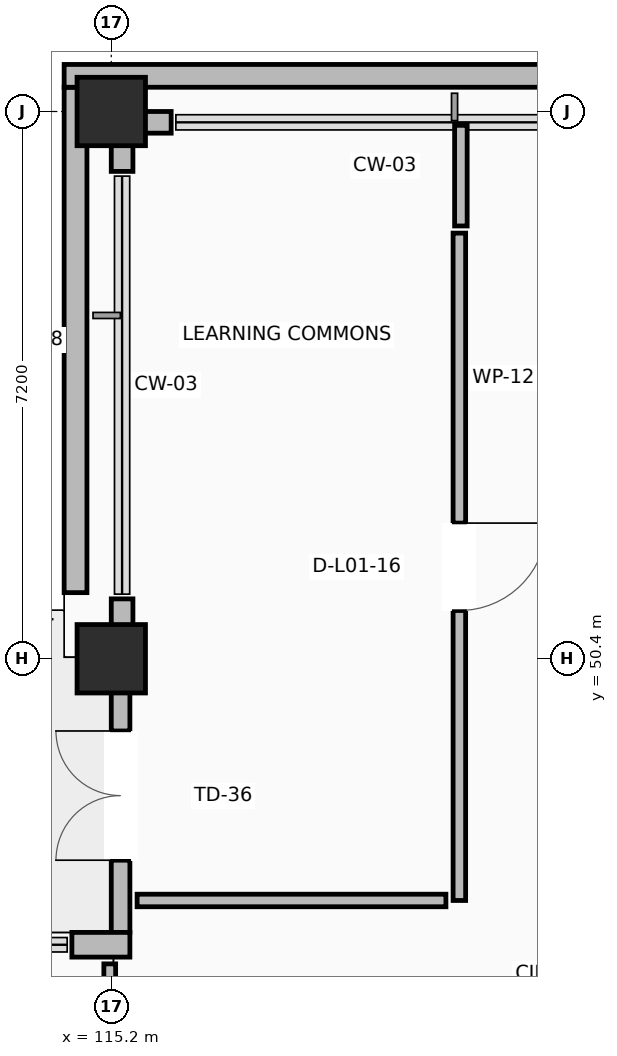
"""IFC4 building model, lengths in metres.
Left out: names, types, materials, properties, quantities, classifications, styles, units other than length and angle.
Written with IfcOpenShell. Run it as: python <this file> out.ifc"""

import sys

from ifc_helpers import new_model, si_unit, direction, frame, frame_2d, origin, origin_2d, place, context, subcontext, project, spatial, rectangle, extrude, element, fill, save


model = new_model("IFC4")
c1 = context("Model", 3, precision=1e-05, world=origin(), true_north=direction((0.0, 1.0)))
c2 = subcontext(c1, "Body", "Model", "MODEL_VIEW")
j1 = project(units=[si_unit("LENGTHUNIT", "METRE"), si_unit("PLANEANGLEUNIT", "RADIAN")], contexts=[c1])
p1 = place(None, origin())
s1 = spatial("IfcSite", under=j1, at=p1, CompositionType="ELEMENT")
p2 = place(p1, origin())
s2 = spatial("IfcBuilding", under=s1, at=p2, CompositionType="ELEMENT")
p3 = place(p2, frame((0.0, 0.0, 4.5)))
s3 = spatial("IfcBuildingStorey", under=s2, at=p3, CompositionType="ELEMENT", Elevation=4.5)
for number, where, z_axis, x_axis in (
    (1, (115.2, 50.4, 0.0), (0.0, 0.0, 1.0), (1.0, 0.0, 0.0)),
    (2, (115.2, 57.6, 0.0), (0.0, 0.0, 1.0), (1.0, 0.0, 0.0)),
):
    element("IfcColumn", number, at=place(p3, frame(where, z_axis=z_axis, x_axis=x_axis)), inside=s3, PredefinedType="COLUMN", context=c2, shape_type="SweptSolid", body=[
        extrude(rectangle(XDim=0.9, YDim=0.9, at=origin_2d()), origin(), (0.0, 0.0, 1.0), 4.22),
    ])
p4 = place(p3, frame((115.988, 57.458, 0.0), z_axis=(0.0, 0.0, 1.0), x_axis=(-1.0, 0.0, 0.0)))
e3 = element("IfcWall", 3, at=p4, inside=s3, PredefinedType="STANDARD", context=c2, shape_type="SweptSolid", body=[
    extrude(rectangle(XDim=0.788, YDim=0.285, at=frame_2d((0.394, 0.0))), origin(), (0.0, 0.0, 1.0), 3.26),
])
p5 = place(p3, frame((115.323, 46.8, 0.0), z_axis=(0.0, 0.0, 1.0), x_axis=(0.0, 1.0, 0.0)))
e4 = element("IfcWall", 4, at=p5, inside=s3, PredefinedType="STANDARD", context=c2, shape_type="SweptSolid", body=[
    extrude(rectangle(XDim=3.6, YDim=0.245, at=frame_2d((1.8, 0.0))), origin(), (0.0, 0.0, 1.0), 3.26),
])
p6 = place(p5, frame((0.95, 0.0, 0.0)))
e5 = element("IfcOpeningElement", 5, at=p6, cuts=e4, PredefinedType="OPENING", context=c2, shape_type="SweptSolid", body=[
    extrude(rectangle(XDim=1.7, YDim=2.2, at=frame_2d((0.85, 1.1))), frame((0.0, 0.133, 0.0), z_axis=(0.0, -1.0, 0.0), x_axis=(1.0, 0.0, 0.0)), (0.0, 0.0, 1.0), 0.265),
])
p7 = place(p3, frame((115.343, 57.315, 0.0), z_axis=(0.0, 0.0, 1.0), x_axis=(0.0, -1.0, 0.0)))
e6 = element("IfcWall", 6, at=p7, inside=s3, PredefinedType="STANDARD", context=c2, shape_type="SweptSolid", body=[
    extrude(rectangle(XDim=0.503, YDim=0.285, at=frame_2d((0.251, 0.0))), origin(), (0.0, 0.0, 1.0), 3.26),
])
p8 = place(p3, frame((115.343, 51.188, 0.0), z_axis=(0.0, 0.0, 1.0), x_axis=(0.0, -1.0, 0.0)))
e7 = element("IfcWall", 7, at=p8, inside=s3, PredefinedType="STANDARD", context=c2, shape_type="SweptSolid", body=[
    extrude(rectangle(XDim=0.788, YDim=0.285, at=frame_2d((0.394, 0.0))), origin(), (0.0, 0.0, 1.0), 3.26),
])
p9 = place(p3, frame((115.445, 46.637, 0.0), z_axis=(0.0, 0.0, 1.0), x_axis=(-1.0, 0.0, 0.0)))
e8 = element("IfcWall", 8, at=p9, inside=s3, PredefinedType="STANDARD", context=c2, shape_type="SweptSolid", body=[
    extrude(rectangle(XDim=0.763, YDim=0.325, at=frame_2d((0.382, 0.0))), origin(), (0.0, 0.0, 1.0), 3.26),
])
p10 = place(p3, frame((114.73, 51.27, 0.0), z_axis=(0.0, 0.0, 1.0), x_axis=(0.0, 1.0, 0.0)))
e9 = element("IfcWall", 9, at=p10, inside=s3, PredefinedType="PARAPET", context=c2, shape_type="SweptSolid", body=[
    extrude(rectangle(XDim=6.649, YDim=0.3, at=frame_2d((3.324, 0.0))), origin(), (0.0, 0.0, 1.0), 1.18),
])
p11 = place(p3, frame((114.58, 58.069, 0.0), z_axis=(0.0, 0.0, 1.0), x_axis=(1.0, 0.0, 0.0)))
e10 = element("IfcWall", 10, at=p11, inside=s3, PredefinedType="PARAPET", context=c2, shape_type="SweptSolid", body=[
    extrude(rectangle(XDim=51.64, YDim=0.3, at=frame_2d((25.82, 0.0))), origin(), (0.0, 0.0, 1.0), 1.18),
])
p12 = place(p3, frame((115.18, 46.386, 0.0), z_axis=(0.0, 0.0, 1.0), x_axis=(0.0, -1.0, 0.0)))
e11 = element("IfcWall", 11, at=p12, inside=s3, PredefinedType="PARTITIONING", context=c2, shape_type="SweptSolid", body=[
    extrude(rectangle(XDim=2.186, YDim=0.155, at=frame_2d((1.093, 0.0))), origin(), (0.0, 0.0, 1.0), 3.26),
])
p13 = place(p3, frame((119.78, 56.0, 0.0), z_axis=(0.0, 0.0, 1.0), x_axis=(0.0, -1.0, 0.0)))
e12 = element("IfcWall", 12, at=p13, inside=s3, PredefinedType="PARTITIONING", context=c2, shape_type="SweptSolid", body=[
    extrude(rectangle(XDim=8.78, YDim=0.165, at=frame_2d((4.39, 0.0))), origin(), (0.0, 0.0, 1.0), 3.26),
])
p14 = place(p13, frame((3.815, 0.0, 0.0)))
e13 = element("IfcOpeningElement", 13, at=p14, cuts=e12, PredefinedType="OPENING", context=c2, shape_type="SweptSolid", body=[
    extrude(rectangle(XDim=1.15, YDim=2.15, at=frame_2d((0.575, 1.075))), frame((0.0, 0.093, 0.0), z_axis=(0.0, -1.0, 0.0), x_axis=(1.0, 0.0, 0.0)), (0.0, 0.0, 1.0), 0.185),
])
p15 = place(p3, frame((119.603, 47.22, 0.0), z_axis=(0.0, 0.0, 1.0), x_axis=(-1.0, 0.0, 0.0)))
e14 = element("IfcWall", 14, at=p15, inside=s3, PredefinedType="PARTITIONING", context=c2, shape_type="SweptSolid", body=[
    extrude(rectangle(XDim=4.063, YDim=0.165, at=frame_2d((2.031, 0.0))), origin(), (0.0, 0.0, 1.0), 3.26),
])
p16 = place(p3, frame((119.8, 57.418, 0.0), z_axis=(0.0, 0.0, 1.0), x_axis=(0.0, -1.0, 0.0)))
e15 = element("IfcWall", 15, at=p16, inside=s3, PredefinedType="PARTITIONING", context=c2, shape_type="SweptSolid", body=[
    extrude(rectangle(XDim=1.324, YDim=0.165, at=frame_2d((0.662, 0.0))), origin(), (0.0, 0.0, 1.0), 3.26),
])
p17 = place(p6, origin())
e16 = element("IfcDoor", 16, at=p17, inside=s3, OperationType="DOUBLE_DOOR_SINGLE_SWING", PredefinedType="DOOR", context=c2, shape_type="SweptSolid", body=[
    extrude(rectangle(XDim=1.7, YDim=2.2, at=frame_2d((0.85, 1.1))), frame((0.0, 0.025, 0.0), z_axis=(0.0, -1.0, 0.0), x_axis=(1.0, 0.0, 0.0)), (0.0, 0.0, 1.0), 0.05),
])
fill(e5, e16)
p18 = place(p14, origin())
e17 = element("IfcDoor", 17, at=p18, inside=s3, OperationType="SINGLE_SWING_LEFT", PredefinedType="DOOR", context=c2, shape_type="SweptSolid", body=[
    extrude(rectangle(XDim=1.15, YDim=2.15, at=frame_2d((0.575, 1.075))), frame((0.0, 0.025, 0.0), z_axis=(0.0, -1.0, 0.0), x_axis=(1.0, 0.0, 0.0)), (0.0, 0.0, 1.0), 0.05),
])
fill(e13, e17)
save(model, sys.argv[1])
